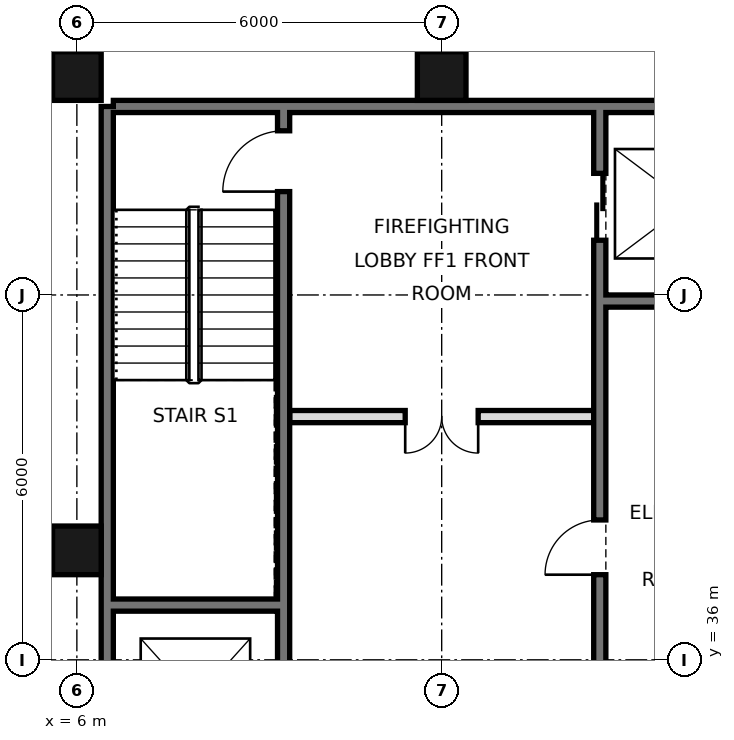
"""IFC4 building model, lengths in metres.
Left out: names, types, materials, properties, quantities, classifications, styles, units other than length and angle.
Written with IfcOpenShell. Run it as: python <this file> out.ifc"""

import sys

from ifc_helpers import new_model, si_unit, direction, frame, frame_2d, origin, origin_2d, place, context, subcontext, project, spatial, rectangle, hollow_rectangle, extrude, element, fill, save


model = new_model("IFC4")
c1 = context("Model", 3, precision=1e-05, world=origin(), true_north=direction((0.0, 1.0)))
c2 = subcontext(c1, "Body", "Model", "MODEL_VIEW")
j1 = project(units=[si_unit("LENGTHUNIT", "METRE"), si_unit("PLANEANGLEUNIT", "RADIAN")], contexts=[c1])
p1 = place(None, origin())
s1 = spatial("IfcSite", under=j1, at=p1, CompositionType="ELEMENT")
p2 = place(p1, origin())
s2 = spatial("IfcBuilding", under=s1, at=p2, CompositionType="ELEMENT")
p3 = place(p2, frame((0.0, 0.0, 110.6)))
s3 = spatial("IfcBuildingStorey", under=s2, at=p3, CompositionType="ELEMENT", Elevation=110.6)
for number, where, z_axis, x_axis in (
    (1, (6.0, 37.8, 0.0), (0.0, 0.0, 1.0), (1.0, 0.0, 0.0)),
    (2, (6.0, 45.6, 0.0), (0.0, 0.0, 1.0), (1.0, 0.0, 0.0)),
    (3, (12.0, 45.6, 0.0), (0.0, 0.0, 1.0), (1.0, 0.0, 0.0)),
):
    element("IfcColumn", number, at=place(p3, frame(where, z_axis=z_axis, x_axis=x_axis)), inside=s3, PredefinedType="COLUMN", context=c2, shape_type="SweptSolid", body=[
        extrude(hollow_rectangle(XDim=0.8, YDim=0.8, WallThickness=0.05, at=origin_2d()), origin(), (0.0, 0.0, 1.0), 3.6),
    ])
p4 = place(p3, frame((6.5, 21.6, 0.0), z_axis=(0.0, 0.0, 1.0), x_axis=(0.0, 1.0, 0.0)))
e4 = element("IfcWall", 4, at=p4, inside=s3, PredefinedType="SOLIDWALL", context=c2, shape_type="SweptSolid", body=[
    extrude(rectangle(XDim=23.5, YDim=0.2, at=frame_2d((11.75, 0.0))), origin(), (0.0, 0.0, 1.0), 3.38),
])
p5 = place(p3, frame((6.6, 45.1, 0.0), z_axis=(0.0, 0.0, 1.0), x_axis=(1.0, 0.0, 0.0)))
e5 = element("IfcWall", 5, at=p5, inside=s3, PredefinedType="SOLIDWALL", context=c2, shape_type="SweptSolid", body=[
    extrude(rectangle(XDim=34.8, YDim=0.2, at=frame_2d((17.4, 0.0))), origin(), (0.0, 0.0, 1.0), 3.38),
])
p6 = place(p3, frame((14.6, 27.5, 0.0), z_axis=(0.0, 0.0, 1.0), x_axis=(0.0, 1.0, 0.0)))
e6 = element("IfcWall", 6, at=p6, inside=s3, PredefinedType="SOLIDWALL", context=c2, shape_type="SweptSolid", body=[
    extrude(rectangle(XDim=17.5, YDim=0.2, at=frame_2d((8.75, 0.0))), origin(), (0.0, 0.0, 1.0), 3.38),
])
p7 = place(p6, frame((1.1, 0.0, 0.0)))
e7 = element("IfcOpeningElement", 7, at=p7, cuts=e6, PredefinedType="OPENING", context=c2, shape_type="SweptSolid", body=[
    extrude(rectangle(XDim=1.1, YDim=2.1, at=frame_2d((0.55, 1.05))), frame((0.0, 0.11, 0.0), z_axis=(0.0, -1.0, 0.0), x_axis=(1.0, 0.0, 0.0)), (0.0, 0.0, 1.0), 0.22),
])
p8 = place(p6, frame((4.2, 0.0, 0.0)))
e8 = element("IfcOpeningElement", 8, at=p8, cuts=e6, PredefinedType="OPENING", context=c2, shape_type="SweptSolid", body=[
    extrude(rectangle(XDim=1.1, YDim=2.1, at=frame_2d((0.55, 1.05))), frame((0.0, 0.11, 0.0), z_axis=(0.0, -1.0, 0.0), x_axis=(1.0, 0.0, 0.0)), (0.0, 0.0, 1.0), 0.22),
])
p9 = place(p6, frame((15.4, 0.0, 0.0)))
e9 = element("IfcOpeningElement", 9, at=p9, cuts=e6, PredefinedType="OPENING", context=c2, shape_type="SweptSolid", body=[
    extrude(rectangle(XDim=1.1, YDim=2.1, at=frame_2d((0.55, 1.05))), frame((0.0, 0.11, 0.0), z_axis=(0.0, -1.0, 0.0), x_axis=(1.0, 0.0, 0.0)), (0.0, 0.0, 1.0), 0.22),
])
p10 = place(p6, frame((9.9, 0.0, 0.0)))
e10 = element("IfcOpeningElement", 10, at=p10, cuts=e6, PredefinedType="OPENING", context=c2, shape_type="SweptSolid", body=[
    extrude(rectangle(XDim=0.9, YDim=2.1, at=frame_2d((0.45, 1.05))), frame((0.0, 0.11, 0.0), z_axis=(0.0, -1.0, 0.0), x_axis=(1.0, 0.0, 0.0)), (0.0, 0.0, 1.0), 0.22),
])
p11 = place(p3, frame((9.4, 21.6, 0.0), z_axis=(0.0, 0.0, 1.0), x_axis=(0.0, 1.0, 0.0)))
e11 = element("IfcWall", 11, at=p11, inside=s3, PredefinedType="SOLIDWALL", context=c2, shape_type="SweptSolid", body=[
    extrude(rectangle(XDim=23.4, YDim=0.2, at=frame_2d((11.7, 0.0))), origin(), (0.0, 0.0, 1.0), 3.38),
])
p12 = place(p11, frame((7.0, 0.0, 0.0)))
e12 = element("IfcOpeningElement", 12, at=p12, cuts=e11, PredefinedType="OPENING", context=c2, shape_type="SweptSolid", body=[
    extrude(rectangle(XDim=1.1, YDim=2.1, at=frame_2d((0.55, 1.05))), frame((0.0, 0.11, 0.0), z_axis=(0.0, -1.0, 0.0), x_axis=(1.0, 0.0, 0.0)), (0.0, 0.0, 1.0), 0.22),
])
p13 = place(p11, frame((10.1, 0.0, 0.0)))
e13 = element("IfcOpeningElement", 13, at=p13, cuts=e11, PredefinedType="OPENING", context=c2, shape_type="SweptSolid", body=[
    extrude(rectangle(XDim=1.1, YDim=2.1, at=frame_2d((0.55, 1.05))), frame((0.0, 0.11, 0.0), z_axis=(0.0, -1.0, 0.0), x_axis=(1.0, 0.0, 0.0)), (0.0, 0.0, 1.0), 0.22),
])
p14 = place(p11, frame((13.2, 0.0, 0.0)))
e14 = element("IfcOpeningElement", 14, at=p14, cuts=e11, PredefinedType="OPENING", context=c2, shape_type="SweptSolid", body=[
    extrude(rectangle(XDim=1.1, YDim=2.1, at=frame_2d((0.55, 1.05))), frame((0.0, 0.11, 0.0), z_axis=(0.0, -1.0, 0.0), x_axis=(1.0, 0.0, 0.0)), (0.0, 0.0, 1.0), 0.22),
])
p15 = place(p11, frame((22.1, 0.0, 0.0)))
e15 = element("IfcOpeningElement", 15, at=p15, cuts=e11, PredefinedType="OPENING", context=c2, shape_type="SweptSolid", body=[
    extrude(rectangle(XDim=1.0, YDim=2.1, at=frame_2d((0.5, 1.05))), frame((0.0, 0.11, 0.0), z_axis=(0.0, -1.0, 0.0), x_axis=(1.0, 0.0, 0.0)), (0.0, 0.0, 1.0), 0.22),
])
p16 = place(p11, frame((0.175, 0.0, 0.0)))
e16 = element("IfcOpeningElement", 16, at=p16, cuts=e11, PredefinedType="OPENING", context=c2, shape_type="SweptSolid", body=[
    extrude(rectangle(XDim=0.9, YDim=2.1, at=frame_2d((0.45, 1.05))), frame((0.0, 0.11, 0.0), z_axis=(0.0, -1.0, 0.0), x_axis=(1.0, 0.0, 0.0)), (0.0, 0.0, 1.0), 0.22),
])
p17 = place(p3, frame((6.6, 36.9, 0.0), z_axis=(0.0, 0.0, 1.0), x_axis=(1.0, 0.0, 0.0)))
e17 = element("IfcWall", 17, at=p17, inside=s3, PredefinedType="SOLIDWALL", context=c2, shape_type="SweptSolid", body=[
    extrude(rectangle(XDim=2.7, YDim=0.2, at=frame_2d((1.35, 0.0))), origin(), (0.0, 0.0, 1.0), 3.38),
])
p18 = place(p3, frame((9.5, 40.0, 0.0), z_axis=(0.0, 0.0, 1.0), x_axis=(1.0, 0.0, 0.0)))
e18 = element("IfcWall", 18, at=p18, inside=s3, PredefinedType="PARTITIONING", context=c2, shape_type="SweptSolid", body=[
    extrude(rectangle(XDim=5.0, YDim=0.2, at=frame_2d((2.5, 0.0))), origin(), (0.0, 0.0, 1.0), 3.38),
])
p19 = place(p18, frame((1.9, 0.0, 0.0)))
e19 = element("IfcOpeningElement", 19, at=p19, cuts=e18, PredefinedType="OPENING", context=c2, shape_type="SweptSolid", body=[
    extrude(rectangle(XDim=1.2, YDim=2.1, at=frame_2d((0.6, 1.05))), frame((0.0, 0.11, 0.0), z_axis=(0.0, -1.0, 0.0), x_axis=(1.0, 0.0, 0.0)), (0.0, 0.0, 1.0), 0.22),
])
p20 = place(p3, frame((14.7, 41.9, 0.0), z_axis=(0.0, 0.0, 1.0), x_axis=(1.0, 0.0, 0.0)))
e20 = element("IfcWall", 20, at=p20, inside=s3, PredefinedType="SOLIDWALL", context=c2, shape_type="SweptSolid", body=[
    extrude(rectangle(XDim=2.7, YDim=0.2, at=frame_2d((1.35, 0.0))), origin(), (0.0, 0.0, 1.0), 3.38),
])
p21 = place(p19, frame((1.2, 0.0, 0.0), z_axis=(0.0, 0.0, 1.0), x_axis=(-1.0, 0.0, 0.0)))
e21 = element("IfcDoor", 21, at=p21, inside=s3, OperationType="DOUBLE_DOOR_SINGLE_SWING", PredefinedType="DOOR", context=c2, shape_type="SweptSolid", body=[
    extrude(rectangle(XDim=1.2, YDim=2.1, at=frame_2d((0.6, 1.05))), frame((0.0, 0.025, 0.0), z_axis=(0.0, -1.0, 0.0), x_axis=(1.0, 0.0, 0.0)), (0.0, 0.0, 1.0), 0.05),
])
fill(e19, e21)
p22 = place(p9, origin())
e22 = element("IfcDoor", 22, at=p22, inside=s3, OperationType="DOUBLE_DOOR_SLIDING", PredefinedType="DOOR", context=c2, shape_type="SweptSolid", body=[
    extrude(rectangle(XDim=1.1, YDim=2.1, at=frame_2d((0.55, 1.05))), frame((0.0, 0.025, 0.0), z_axis=(0.0, -1.0, 0.0), x_axis=(1.0, 0.0, 0.0)), (0.0, 0.0, 1.0), 0.05),
])
fill(e9, e22)
p23 = place(p15, origin())
e23 = element("IfcDoor", 23, at=p23, inside=s3, OperationType="SINGLE_SWING_LEFT", PredefinedType="DOOR", context=c2, shape_type="SweptSolid", body=[
    extrude(rectangle(XDim=1.0, YDim=2.1, at=frame_2d((0.5, 1.05))), frame((0.0, 0.025, 0.0), z_axis=(0.0, -1.0, 0.0), x_axis=(1.0, 0.0, 0.0)), (0.0, 0.0, 1.0), 0.05),
])
fill(e15, e23)
p24 = place(p10, origin())
e24 = element("IfcDoor", 24, at=p24, inside=s3, OperationType="SINGLE_SWING_LEFT", PredefinedType="DOOR", context=c2, shape_type="SweptSolid", body=[
    extrude(rectangle(XDim=0.9, YDim=2.1, at=frame_2d((0.45, 1.05))), frame((0.0, 0.025, 0.0), z_axis=(0.0, -1.0, 0.0), x_axis=(1.0, 0.0, 0.0)), (0.0, 0.0, 1.0), 0.05),
])
fill(e10, e24)
save(model, sys.argv[1])
